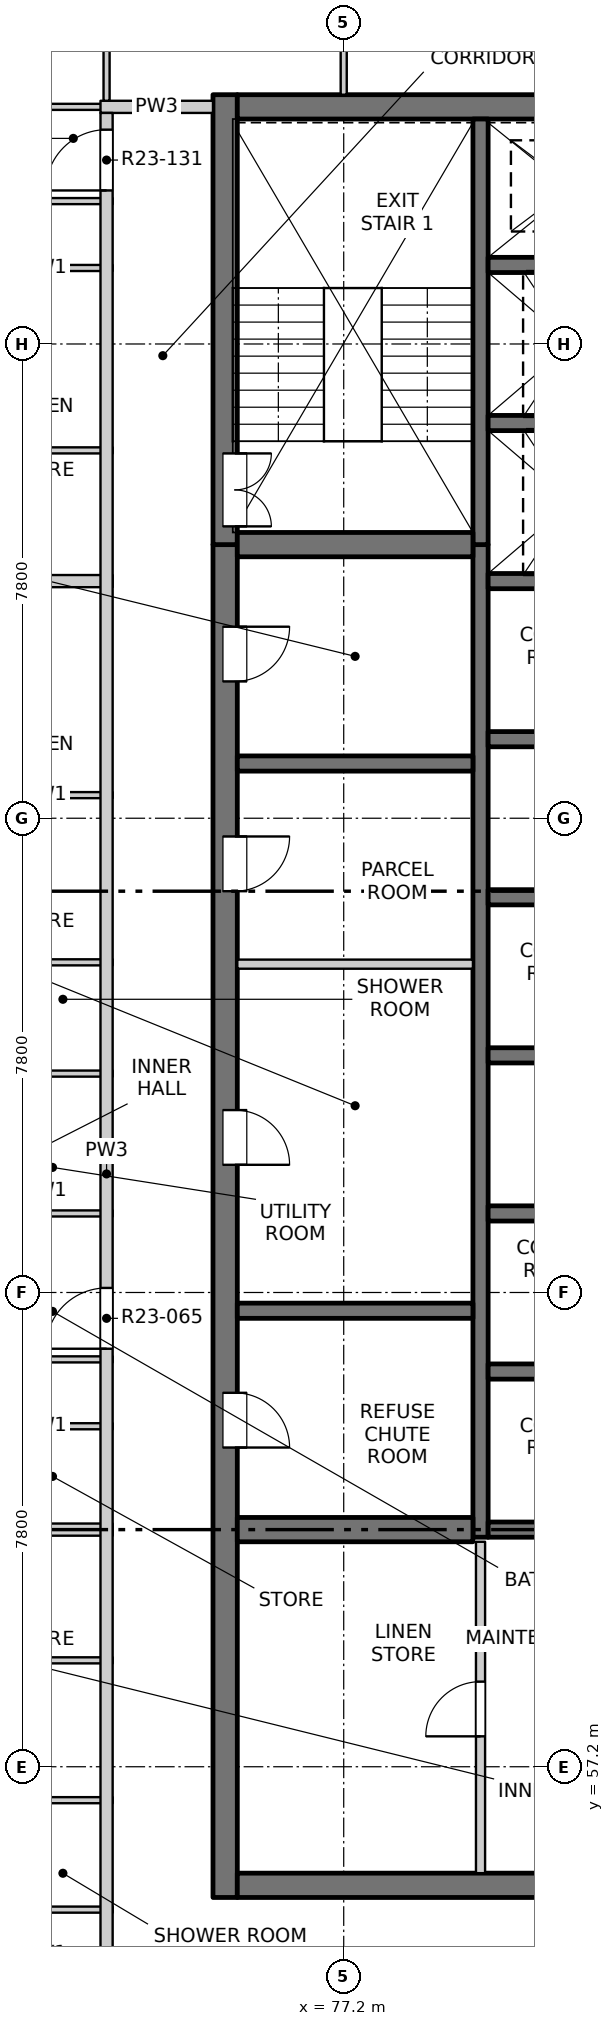
"""IFC4 building model, lengths in metres.
Left out: names, types, materials, properties, quantities, classifications, styles, units other than length and angle.
Written with IfcOpenShell. Run it as: python <this file> out.ifc"""

import sys

from ifc_helpers import new_model, si_unit, direction, frame, frame_2d, origin, place, context, subcontext, project, spatial, rectangle, extrude, element, fill, save


model = new_model("IFC4")
c1 = context("Model", 3, precision=1e-05, world=origin(), true_north=direction((0.0, 1.0)))
c2 = subcontext(c1, "Body", "Model", "MODEL_VIEW")
j1 = project(units=[si_unit("LENGTHUNIT", "METRE"), si_unit("PLANEANGLEUNIT", "RADIAN")], contexts=[c1])
p1 = place(None, origin())
s1 = spatial("IfcSite", under=j1, at=p1, CompositionType="ELEMENT")
p2 = place(p1, origin())
s2 = spatial("IfcBuilding", under=s1, at=p2, CompositionType="ELEMENT")
p3 = place(p2, frame((0.0, 0.0, 234.7)))
s3 = spatial("IfcBuildingStorey", under=s2, at=p3, CompositionType="ELEMENT", Elevation=234.7)
p4 = place(p3, frame((75.25, 55.05, -0.25), z_axis=(0.0, 0.0, 1.0), x_axis=(0.0, 1.0, 0.0)))
e1 = element("IfcWall", 1, at=p4, inside=s3, PredefinedType="SOLIDWALL", context=c2, shape_type="SweptSolid", body=[
    extrude(rectangle(XDim=22.25, YDim=0.4, at=frame_2d((11.125, 0.0))), origin(), (0.0, 0.0, 1.0), 3.4),
])
p5 = place(p4, frame((7.4, 0.0, 0.25)))
e2 = element("IfcOpeningElement", 2, at=p5, cuts=e1, PredefinedType="OPENING", context=c2, shape_type="SweptSolid", body=[
    extrude(rectangle(XDim=0.9, YDim=2.1, at=frame_2d((0.45, 1.05))), frame((0.0, 0.21, 0.0), z_axis=(0.0, -1.0, 0.0), x_axis=(1.0, 0.0, 0.0)), (0.0, 0.0, 1.0), 0.42),
])
p6 = place(p4, frame((12.05, 0.0, 0.25)))
e3 = element("IfcOpeningElement", 3, at=p6, cuts=e1, PredefinedType="OPENING", context=c2, shape_type="SweptSolid", body=[
    extrude(rectangle(XDim=0.9, YDim=2.1, at=frame_2d((0.45, 1.05))), frame((0.0, 0.21, 0.0), z_axis=(0.0, -1.0, 0.0), x_axis=(1.0, 0.0, 0.0)), (0.0, 0.0, 1.0), 0.42),
])
p7 = place(p4, frame((16.55, 0.0, 0.25)))
e4 = element("IfcOpeningElement", 4, at=p7, cuts=e1, PredefinedType="OPENING", context=c2, shape_type="SweptSolid", body=[
    extrude(rectangle(XDim=0.9, YDim=2.1, at=frame_2d((0.45, 1.05))), frame((0.0, 0.21, 0.0), z_axis=(0.0, -1.0, 0.0), x_axis=(1.0, 0.0, 0.0)), (0.0, 0.0, 1.0), 0.42),
])
p8 = place(p4, frame((20.0, 0.0, 0.25)))
e5 = element("IfcOpeningElement", 5, at=p8, cuts=e1, PredefinedType="OPENING", context=c2, shape_type="SweptSolid", body=[
    extrude(rectangle(XDim=0.9, YDim=2.1, at=frame_2d((0.45, 1.05))), frame((0.0, 0.21, 0.0), z_axis=(0.0, -1.0, 0.0), x_axis=(1.0, 0.0, 0.0)), (0.0, 0.0, 1.0), 0.42),
])
p9 = place(p3, frame((75.25, 77.3, -0.25), z_axis=(0.0, 0.0, 1.0), x_axis=(0.0, 1.0, 0.0)))
e6 = element("IfcWall", 6, at=p9, inside=s3, PredefinedType="SOLIDWALL", context=c2, shape_type="SweptSolid", body=[
    extrude(rectangle(XDim=7.4, YDim=0.4, at=frame_2d((3.7, 0.0))), origin(), (0.0, 0.0, 1.0), 3.4),
])
p10 = place(p9, frame((0.3, 0.0, 0.25)))
e7 = element("IfcOpeningElement", 7, at=p10, cuts=e6, PredefinedType="OPENING", context=c2, shape_type="SweptSolid", body=[
    extrude(rectangle(XDim=1.2, YDim=2.1, at=frame_2d((0.6, 1.05))), frame((0.0, 0.21, 0.0), z_axis=(0.0, -1.0, 0.0), x_axis=(1.0, 0.0, 0.0)), (0.0, 0.0, 1.0), 0.42),
])
p11 = place(p3, frame((75.45, 55.25, -0.25), z_axis=(0.0, 0.0, 1.0), x_axis=(1.0, 0.0, 0.0)))
e8 = element("IfcWall", 8, at=p11, inside=s3, PredefinedType="SOLIDWALL", context=c2, shape_type="SweptSolid", body=[
    extrude(rectangle(XDim=19.1, YDim=0.4, at=frame_2d((9.55, 0.0))), origin(), (0.0, 0.0, 1.0), 3.4),
])
p12 = place(p11, frame((8.8, 0.0, 0.25)))
e9 = element("IfcOpeningElement", 9, at=p12, cuts=e8, PredefinedType="OPENING", context=c2, shape_type="SweptSolid", body=[
    extrude(rectangle(XDim=1.5, YDim=2.1, at=frame_2d((0.75, 1.05))), frame((0.0, 0.21, 0.0), z_axis=(0.0, -1.0, 0.0), x_axis=(1.0, 0.0, 0.0)), (0.0, 0.0, 1.0), 0.42),
])
p13 = place(p3, frame((75.45, 84.5, -0.25), z_axis=(0.0, 0.0, 1.0), x_axis=(1.0, 0.0, 0.0)))
e10 = element("IfcWall", 10, at=p13, inside=s3, PredefinedType="SOLIDWALL", context=c2, shape_type="SweptSolid", body=[
    extrude(rectangle(XDim=19.1, YDim=0.4, at=frame_2d((9.55, 0.0))), origin(), (0.0, 0.0, 1.0), 3.4),
])
p14 = place(p3, frame((79.45, 60.975, -0.25), z_axis=(0.0, 0.0, 1.0), x_axis=(0.0, 1.0, 0.0)))
e11 = element("IfcWall", 11, at=p14, inside=s3, PredefinedType="SOLIDWALL", context=c2, shape_type="SweptSolid", body=[
    extrude(rectangle(XDim=16.325, YDim=0.25, at=frame_2d((8.163, 0.0))), origin(), (0.0, 0.0, 1.0), 3.4),
])
p15 = place(p3, frame((79.45, 77.3, -0.25), z_axis=(0.0, 0.0, 1.0), x_axis=(0.0, 1.0, 0.0)))
e12 = element("IfcWall", 12, at=p15, inside=s3, PredefinedType="SOLIDWALL", context=c2, shape_type="SweptSolid", body=[
    extrude(rectangle(XDim=7.0, YDim=0.25, at=frame_2d((3.5, 0.0))), origin(), (0.0, 0.0, 1.0), 3.4),
])
for number, where, z_axis, x_axis in (
    (13, (79.575, 61.1, -0.25), (0.0, 0.0, 1.0), (1.0, 0.0, 0.0)),
    (14, (79.575, 63.7, -0.25), (0.0, 0.0, 1.0), (1.0, 0.0, 0.0)),
    (15, (79.575, 66.3, -0.25), (0.0, 0.0, 1.0), (1.0, 0.0, 0.0)),
    (16, (79.575, 68.9, -0.25), (0.0, 0.0, 1.0), (1.0, 0.0, 0.0)),
    (17, (79.575, 71.5, -0.25), (0.0, 0.0, 1.0), (1.0, 0.0, 0.0)),
    (18, (79.575, 74.1, -0.25), (0.0, 0.0, 1.0), (1.0, 0.0, 0.0)),
    (19, (79.575, 76.7, -0.25), (0.0, 0.0, 1.0), (1.0, 0.0, 0.0)),
    (20, (79.575, 79.3, -0.25), (0.0, 0.0, 1.0), (1.0, 0.0, 0.0)),
    (21, (79.575, 81.9, -0.25), (0.0, 0.0, 1.0), (1.0, 0.0, 0.0)),
):
    element("IfcWall", number, at=place(p3, frame(where, z_axis=z_axis, x_axis=x_axis)), inside=s3, PredefinedType="SOLIDWALL", context=c2, shape_type="SweptSolid", body=[
        extrude(rectangle(XDim=3.0, YDim=0.25, at=frame_2d((1.5, 0.0))), origin(), (0.0, 0.0, 1.0), 3.4),
    ])
p16 = place(p3, frame((75.45, 61.1, -0.25), z_axis=(0.0, 0.0, 1.0), x_axis=(1.0, 0.0, 0.0)))
e22 = element("IfcWall", 22, at=p16, inside=s3, PredefinedType="SOLIDWALL", context=c2, shape_type="SweptSolid", body=[
    extrude(rectangle(XDim=3.875, YDim=0.4, at=frame_2d((1.938, 0.0))), origin(), (0.0, 0.0, 1.0), 3.4),
])
for number, where, z_axis, x_axis in (
    (23, (75.45, 64.7, -0.25), (0.0, 0.0, 1.0), (1.0, 0.0, 0.0)),
    (24, (75.45, 73.7, -0.25), (0.0, 0.0, 1.0), (1.0, 0.0, 0.0)),
):
    element("IfcWall", number, at=place(p3, frame(where, z_axis=z_axis, x_axis=x_axis)), inside=s3, PredefinedType="SOLIDWALL", context=c2, shape_type="SweptSolid", body=[
        extrude(rectangle(XDim=3.875, YDim=0.25, at=frame_2d((1.938, 0.0))), origin(), (0.0, 0.0, 1.0), 3.4),
    ])
p17 = place(p3, frame((75.45, 77.3, -0.25), z_axis=(0.0, 0.0, 1.0), x_axis=(1.0, 0.0, 0.0)))
e25 = element("IfcWall", 25, at=p17, inside=s3, PredefinedType="SOLIDWALL", context=c2, shape_type="SweptSolid", body=[
    extrude(rectangle(XDim=3.875, YDim=0.4, at=frame_2d((1.938, 0.0))), origin(), (0.0, 0.0, 1.0), 3.4),
])
for number, where, z_axis, x_axis in (
    (26, (71.18, 54.85, 0.0), (0.0, 0.0, 1.0), (1.0, 0.0, 0.0)),
    (27, (71.18, 56.65, 0.0), (0.0, 0.0, 1.0), (1.0, 0.0, 0.0)),
    (28, (71.18, 58.95, 0.0), (0.0, 0.0, 1.0), (1.0, 0.0, 0.0)),
):
    element("IfcWall", number, at=place(p3, frame(where, z_axis=z_axis, x_axis=x_axis)), inside=s3, PredefinedType="PARTITIONING", context=c2, shape_type="SweptSolid", body=[
        extrude(rectangle(XDim=2.22, YDim=0.1, at=frame_2d((1.11, 0.0))), origin(), (0.0, 0.0, 1.0), 3.15),
    ])
p18 = place(p3, frame((61.9, 61.1, 0.0), z_axis=(0.0, 0.0, 1.0), x_axis=(1.0, 0.0, 0.0)))
e29 = element("IfcWall", 29, at=p18, inside=s3, PredefinedType="PARTITIONING", context=c2, shape_type="SweptSolid", body=[
    extrude(rectangle(XDim=11.5, YDim=0.2, at=frame_2d((5.75, 0.0))), origin(), (0.0, 0.0, 1.0), 2.55),
])
for number, where, z_axis, x_axis in (
    (30, (71.18, 62.8, 0.0), (0.0, 0.0, 1.0), (1.0, 0.0, 0.0)),
    (31, (71.18, 63.9, 0.0), (0.0, 0.0, 1.0), (1.0, 0.0, 0.0)),
    (32, (71.18, 66.3, 0.0), (0.0, 0.0, 1.0), (1.0, 0.0, 0.0)),
    (33, (71.18, 68.6, 0.0), (0.0, 0.0, 1.0), (1.0, 0.0, 0.0)),
):
    element("IfcWall", number, at=place(p3, frame(where, z_axis=z_axis, x_axis=x_axis)), inside=s3, PredefinedType="PARTITIONING", context=c2, shape_type="SweptSolid", body=[
        extrude(rectangle(XDim=2.22, YDim=0.1, at=frame_2d((1.11, 0.0))), origin(), (0.0, 0.0, 1.0), 3.15),
    ])
p19 = place(p3, frame((75.45, 70.4, 0.0), z_axis=(0.0, 0.0, 1.0), x_axis=(1.0, 0.0, 0.0)))
e34 = element("IfcWall", 34, at=p19, inside=s3, PredefinedType="PARTITIONING", context=c2, shape_type="SweptSolid", body=[
    extrude(rectangle(XDim=3.875, YDim=0.15, at=frame_2d((1.938, 0.0))), origin(), (0.0, 0.0, 1.0), 3.15),
])
for number, where, z_axis, x_axis in (
    (35, (71.18, 70.43, 0.0), (0.0, 0.0, 1.0), (1.0, 0.0, 0.0)),
    (36, (71.18, 73.18, 0.0), (0.0, 0.0, 1.0), (1.0, 0.0, 0.0)),
):
    element("IfcWall", number, at=place(p3, frame(where, z_axis=z_axis, x_axis=x_axis)), inside=s3, PredefinedType="PARTITIONING", context=c2, shape_type="SweptSolid", body=[
        extrude(rectangle(XDim=2.22, YDim=0.1, at=frame_2d((1.11, 0.0))), origin(), (0.0, 0.0, 1.0), 3.15),
    ])
p20 = place(p3, frame((61.9, 76.7, 0.0), z_axis=(0.0, 0.0, 1.0), x_axis=(1.0, 0.0, 0.0)))
e37 = element("IfcWall", 37, at=p20, inside=s3, PredefinedType="PARTITIONING", context=c2, shape_type="SweptSolid", body=[
    extrude(rectangle(XDim=11.5, YDim=0.2, at=frame_2d((5.75, 0.0))), origin(), (0.0, 0.0, 1.0), 2.55),
])
for number, where, z_axis, x_axis in (
    (38, (71.18, 78.85, 0.0), (0.0, 0.0, 1.0), (1.0, 0.0, 0.0)),
    (39, (71.18, 81.85, 0.0), (0.0, 0.0, 1.0), (1.0, 0.0, 0.0)),
    (40, (71.18, 82.95, 0.0), (0.0, 0.0, 1.0), (1.0, 0.0, 0.0)),
):
    element("IfcWall", number, at=place(p3, frame(where, z_axis=z_axis, x_axis=x_axis)), inside=s3, PredefinedType="PARTITIONING", context=c2, shape_type="SweptSolid", body=[
        extrude(rectangle(XDim=2.22, YDim=0.1, at=frame_2d((1.11, 0.0))), origin(), (0.0, 0.0, 1.0), 3.15),
    ])
p21 = place(p3, frame((61.9, 84.5, 0.0), z_axis=(0.0, 0.0, 1.0), x_axis=(1.0, 0.0, 0.0)))
e41 = element("IfcWall", 41, at=p21, inside=s3, PredefinedType="PARTITIONING", context=c2, shape_type="SweptSolid", body=[
    extrude(rectangle(XDim=11.5, YDim=0.1, at=frame_2d((5.75, 0.0))), origin(), (0.0, 0.0, 1.0), 3.15),
])
p22 = place(p21, frame((7.965, 0.0, 0.0)))
e42 = element("IfcOpeningElement", 42, at=p22, cuts=e41, PredefinedType="OPENING", context=c2, shape_type="SweptSolid", body=[
    extrude(rectangle(XDim=0.9, YDim=2.1, at=frame_2d((0.45, 1.05))), frame((0.0, 0.06, 0.0), z_axis=(0.0, -1.0, 0.0), x_axis=(1.0, 0.0, 0.0)), (0.0, 0.0, 1.0), 0.12),
])
p23 = place(p3, frame((73.2, 84.5, 0.0), z_axis=(0.0, 0.0, 1.0), x_axis=(1.0, 0.0, 0.0)))
e43 = element("IfcWall", 43, at=p23, inside=s3, PredefinedType="PARTITIONING", context=c2, shape_type="SweptSolid", body=[
    extrude(rectangle(XDim=1.85, YDim=0.2, at=frame_2d((0.925, 0.0))), origin(), (0.0, 0.0, 1.0), 3.15),
])
p24 = place(p3, frame((73.3, 49.5, 0.0), z_axis=(0.0, 0.0, 1.0), x_axis=(0.0, 1.0, 0.0)))
e44 = element("IfcWall", 44, at=p24, inside=s3, PredefinedType="PARTITIONING", context=c2, shape_type="SweptSolid", body=[
    extrude(rectangle(XDim=34.9, YDim=0.2, at=frame_2d((17.45, 0.0))), origin(), (0.0, 0.0, 1.0), 3.15),
])
p25 = place(p24, frame((3.075, 0.0, 0.0)))
e45 = element("IfcOpeningElement", 45, at=p25, cuts=e44, PredefinedType="OPENING", context=c2, shape_type="SweptSolid", body=[
    extrude(rectangle(XDim=1.0, YDim=2.1, at=frame_2d((0.5, 1.05))), frame((0.0, 0.11, 0.0), z_axis=(0.0, -1.0, 0.0), x_axis=(1.0, 0.0, 0.0)), (0.0, 0.0, 1.0), 0.22),
])
p26 = place(p24, frame((14.575, 0.0, 0.0)))
e46 = element("IfcOpeningElement", 46, at=p26, cuts=e44, PredefinedType="OPENING", context=c2, shape_type="SweptSolid", body=[
    extrude(rectangle(XDim=1.0, YDim=2.1, at=frame_2d((0.5, 1.05))), frame((0.0, 0.11, 0.0), z_axis=(0.0, -1.0, 0.0), x_axis=(1.0, 0.0, 0.0)), (0.0, 0.0, 1.0), 0.22),
])
p27 = place(p24, frame((33.625, 0.0, 0.0)))
e47 = element("IfcOpeningElement", 47, at=p27, cuts=e44, PredefinedType="OPENING", context=c2, shape_type="SweptSolid", body=[
    extrude(rectangle(XDim=1.0, YDim=2.1, at=frame_2d((0.5, 1.05))), frame((0.0, 0.11, 0.0), z_axis=(0.0, -1.0, 0.0), x_axis=(1.0, 0.0, 0.0)), (0.0, 0.0, 1.0), 0.22),
])
p28 = place(p3, frame((73.3, 84.6, 0.0), z_axis=(0.0, 0.0, 1.0), x_axis=(0.0, 1.0, 0.0)))
e48 = element("IfcWall", 48, at=p28, inside=s3, PredefinedType="PARTITIONING", context=c2, shape_type="SweptSolid", body=[
    extrude(rectangle(XDim=3.5, YDim=0.1, at=frame_2d((1.75, 0.0))), origin(), (0.0, 0.0, 1.0), 3.15),
])
p29 = place(p28, frame((1.4, 0.0, 0.0)))
e49 = element("IfcOpeningElement", 49, at=p29, cuts=e48, PredefinedType="OPENING", context=c2, shape_type="SweptSolid", body=[
    extrude(rectangle(XDim=0.9, YDim=2.1, at=frame_2d((0.45, 1.05))), frame((0.0, 0.06, 0.0), z_axis=(0.0, -1.0, 0.0), x_axis=(1.0, 0.0, 0.0)), (0.0, 0.0, 1.0), 0.12),
])
p30 = place(p3, frame((77.2, 84.7, 0.0), z_axis=(0.0, 0.0, 1.0), x_axis=(0.0, 1.0, 0.0)))
e50 = element("IfcWall", 50, at=p30, inside=s3, PredefinedType="PARTITIONING", context=c2, shape_type="SweptSolid", body=[
    extrude(rectangle(XDim=3.4, YDim=0.1, at=frame_2d((1.7, 0.0))), origin(), (0.0, 0.0, 1.0), 3.15),
])
p31 = place(p30, frame((1.3, 0.0, 0.0)))
e51 = element("IfcOpeningElement", 51, at=p31, cuts=e50, PredefinedType="OPENING", context=c2, shape_type="SweptSolid", body=[
    extrude(rectangle(XDim=0.9, YDim=2.1, at=frame_2d((0.45, 1.05))), frame((0.0, 0.06, 0.0), z_axis=(0.0, -1.0, 0.0), x_axis=(1.0, 0.0, 0.0)), (0.0, 0.0, 1.0), 0.12),
])
p32 = place(p3, frame((79.45, 55.45, 0.0), z_axis=(0.0, 0.0, 1.0), x_axis=(0.0, 1.0, 0.0)))
e52 = element("IfcWall", 52, at=p32, inside=s3, PredefinedType="PARTITIONING", context=c2, shape_type="SweptSolid", body=[
    extrude(rectangle(XDim=5.45, YDim=0.15, at=frame_2d((2.725, 0.0))), origin(), (0.0, 0.0, 1.0), 3.15),
])
p33 = place(p32, frame((2.25, 0.0, 0.0)))
e53 = element("IfcOpeningElement", 53, at=p33, cuts=e52, PredefinedType="OPENING", context=c2, shape_type="SweptSolid", body=[
    extrude(rectangle(XDim=0.9, YDim=2.1, at=frame_2d((0.45, 1.05))), frame((0.0, 0.085, 0.0), z_axis=(0.0, -1.0, 0.0), x_axis=(1.0, 0.0, 0.0)), (0.0, 0.0, 1.0), 0.17),
])
p34 = place(p33, origin())
e54 = element("IfcDoor", 54, at=p34, inside=s3, OperationType="SINGLE_SWING_LEFT", PredefinedType="DOOR", context=c2, shape_type="SweptSolid", body=[
    extrude(rectangle(XDim=0.9, YDim=2.1, at=frame_2d((0.45, 1.05))), frame((0.0, 0.025, 0.0), z_axis=(0.0, -1.0, 0.0), x_axis=(1.0, 0.0, 0.0)), (0.0, 0.0, 1.0), 0.05),
])
fill(e53, e54)
p35 = place(p5, origin())
e55 = element("IfcDoor", 55, at=p35, inside=s3, OperationType="SINGLE_SWING_RIGHT", PredefinedType="DOOR", context=c2, shape_type="SweptSolid", body=[
    extrude(rectangle(XDim=0.9, YDim=2.1, at=frame_2d((0.45, 1.05))), frame((0.0, -0.135, 0.0), z_axis=(0.0, -1.0, 0.0), x_axis=(1.0, 0.0, 0.0)), (0.0, 0.0, 1.0), 0.05),
])
fill(e2, e55)
p36 = place(p26, origin())
e56 = element("IfcDoor", 56, at=p36, inside=s3, OperationType="SINGLE_SWING_RIGHT", PredefinedType="DOOR", context=c2, shape_type="SweptSolid", body=[
    extrude(rectangle(XDim=1.0, YDim=2.1, at=frame_2d((0.5, 1.05))), frame((0.0, 0.025, 0.0), z_axis=(0.0, -1.0, 0.0), x_axis=(1.0, 0.0, 0.0)), (0.0, 0.0, 1.0), 0.05),
])
fill(e46, e56)
p37 = place(p6, origin())
e57 = element("IfcDoor", 57, at=p37, inside=s3, OperationType="SINGLE_SWING_RIGHT", PredefinedType="DOOR", context=c2, shape_type="SweptSolid", body=[
    extrude(rectangle(XDim=0.9, YDim=2.1, at=frame_2d((0.45, 1.05))), frame((0.0, -0.135, 0.0), z_axis=(0.0, -1.0, 0.0), x_axis=(1.0, 0.0, 0.0)), (0.0, 0.0, 1.0), 0.05),
])
fill(e3, e57)
p38 = place(p7, origin())
e58 = element("IfcDoor", 58, at=p38, inside=s3, OperationType="SINGLE_SWING_LEFT", PredefinedType="DOOR", context=c2, shape_type="SweptSolid", body=[
    extrude(rectangle(XDim=0.9, YDim=2.1, at=frame_2d((0.45, 1.05))), frame((0.0, -0.135, 0.0), z_axis=(0.0, -1.0, 0.0), x_axis=(1.0, 0.0, 0.0)), (0.0, 0.0, 1.0), 0.05),
])
fill(e4, e58)
p39 = place(p8, origin())
e59 = element("IfcDoor", 59, at=p39, inside=s3, OperationType="SINGLE_SWING_LEFT", PredefinedType="DOOR", context=c2, shape_type="SweptSolid", body=[
    extrude(rectangle(XDim=0.9, YDim=2.1, at=frame_2d((0.45, 1.05))), frame((0.0, -0.135, 0.0), z_axis=(0.0, -1.0, 0.0), x_axis=(1.0, 0.0, 0.0)), (0.0, 0.0, 1.0), 0.05),
])
fill(e5, e59)
p40 = place(p10, origin())
e60 = element("IfcDoor", 60, at=p40, inside=s3, OperationType="DOUBLE_DOOR_SINGLE_SWING", PredefinedType="DOOR", context=c2, shape_type="SweptSolid", body=[
    extrude(rectangle(XDim=1.2, YDim=2.1, at=frame_2d((0.6, 1.05))), frame((0.0, -0.135, 0.0), z_axis=(0.0, -1.0, 0.0), x_axis=(1.0, 0.0, 0.0)), (0.0, 0.0, 1.0), 0.05),
])
fill(e7, e60)
p41 = place(p27, origin())
e61 = element("IfcDoor", 61, at=p41, inside=s3, OperationType="SINGLE_SWING_RIGHT", PredefinedType="DOOR", context=c2, shape_type="SweptSolid", body=[
    extrude(rectangle(XDim=1.0, YDim=2.1, at=frame_2d((0.5, 1.05))), frame((0.0, 0.025, 0.0), z_axis=(0.0, -1.0, 0.0), x_axis=(1.0, 0.0, 0.0)), (0.0, 0.0, 1.0), 0.05),
])
fill(e47, e61)
save(model, sys.argv[1])
